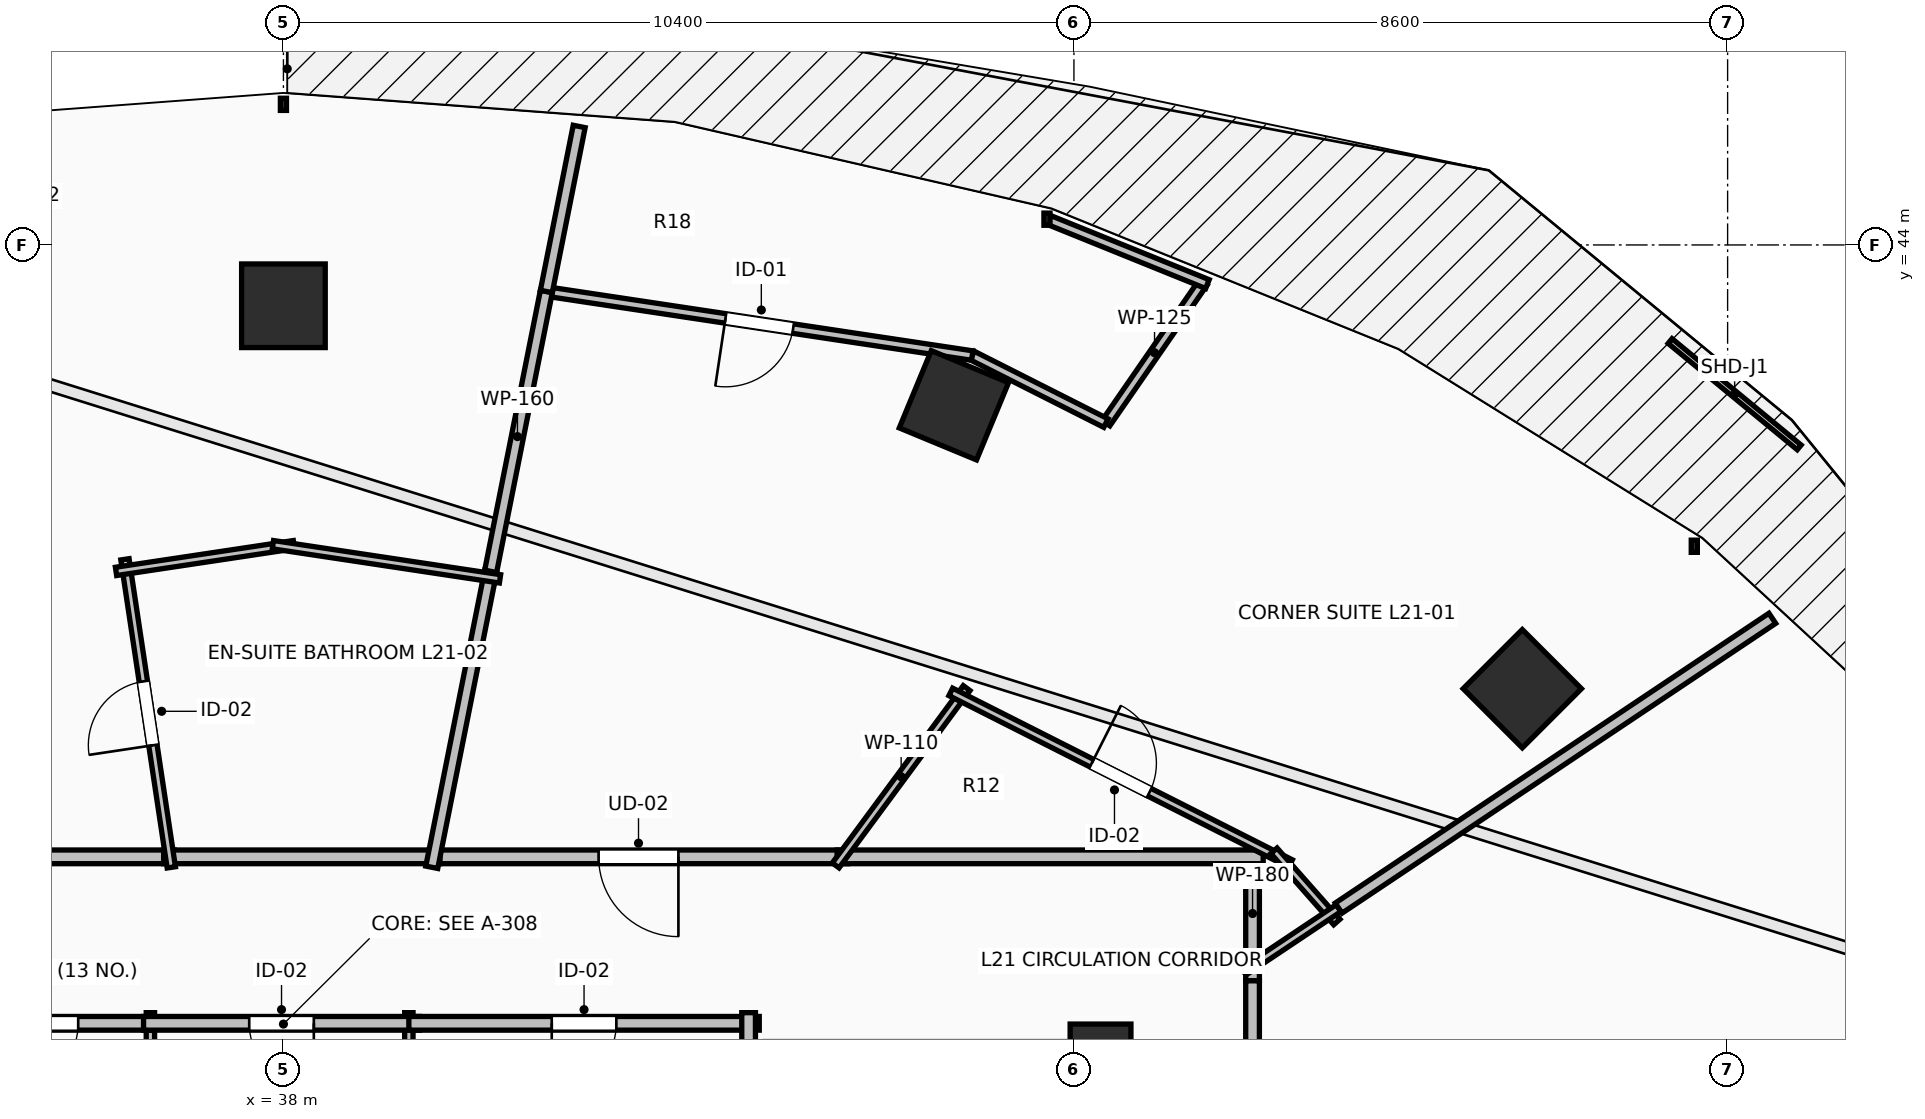
"""IFC4 building model, lengths in metres.
Left out: names, types, materials, properties, quantities, classifications, styles, units other than length and angle.
Written with IfcOpenShell. Run it as: python <this file> out.ifc"""

import sys

from ifc_helpers import new_model, si_unit, direction, frame, frame_2d, origin, origin_2d, place, context, subcontext, project, spatial, rectangle, extrude, element, fill, save


model = new_model("IFC4")
c1 = context("Model", 3, precision=1e-05, world=origin(), true_north=direction((0.0, 1.0)))
c2 = subcontext(c1, "Body", "Model", "MODEL_VIEW")
j1 = project(units=[si_unit("LENGTHUNIT", "METRE"), si_unit("PLANEANGLEUNIT", "RADIAN")], contexts=[c1])
p1 = place(None, origin())
s1 = spatial("IfcSite", under=j1, at=p1, CompositionType="ELEMENT")
p2 = place(p1, origin())
s2 = spatial("IfcBuilding", under=s1, at=p2, CompositionType="ELEMENT")
p3 = place(p2, frame((0.0, 0.0, 82.3)))
s3 = spatial("IfcBuildingStorey", under=s2, at=p3, CompositionType="ELEMENT", Elevation=82.3)
for number, where, z_axis, x_axis in (
    (1, (54.299, 38.162, 0.0), (0.0, 0.0, 1.0), (0.707, 0.707, 0.0)),
    (2, (46.821, 41.891, 0.0), (0.0, 0.0, 1.0), (0.383, 0.924, 0.0)),
    (3, (38.0, 43.2, 0.0), (0.0, 0.0, 1.0), (0.0, 1.0, 0.0)),
):
    element("IfcColumn", number, at=place(p3, frame(where, z_axis=z_axis, x_axis=x_axis)), inside=s3, PredefinedType="COLUMN", context=c2, shape_type="SweptSolid", body=[
        extrude(rectangle(XDim=1.1, YDim=1.1, at=origin_2d()), origin(), (0.0, 0.0, 1.0), 3.5),
    ])
p4 = place(p3, frame((48.75, 33.15, 0.0), z_axis=(0.0, 0.0, 1.0), x_axis=(1.0, 0.0, 0.0)))
e4 = element("IfcColumn", 4, at=p4, inside=s3, PredefinedType="PILASTER", context=c2, shape_type="SweptSolid", body=[
    extrude(rectangle(XDim=0.8, YDim=1.2, at=origin_2d()), origin(), (0.0, 0.0, 1.0), 3.5),
])
p5 = place(p3, frame((36.25, 30.34, 0.0), z_axis=(0.0, 0.0, 1.0), x_axis=(0.0, 1.0, 0.0)))
e5 = element("IfcWall", 5, at=p5, inside=s3, PredefinedType="PARTITIONING", context=c2, shape_type="SweptSolid", body=[
    extrude(rectangle(XDim=3.56, YDim=0.11, at=frame_2d((1.78, 0.0))), origin(), (0.0, 0.0, 1.0), 2.432),
])
p6 = place(p3, frame((36.25, 33.76, 0.0), z_axis=(0.0, 0.0, 1.0), x_axis=(-1.0, 0.0, 0.0)))
e6 = element("IfcWall", 6, at=p6, inside=s3, PredefinedType="PARTITIONING", context=c2, shape_type="SweptSolid", body=[
    extrude(rectangle(XDim=2.75, YDim=0.18, at=frame_2d((1.375, 0.0))), origin(), (0.0, 0.0, 1.0), 3.24),
])
p7 = place(p6, frame((0.95, 0.0, 0.0)))
e7 = element("IfcOpeningElement", 7, at=p7, cuts=e6, PredefinedType="OPENING", context=c2, shape_type="SweptSolid", body=[
    extrude(rectangle(XDim=0.85, YDim=2.1, at=frame_2d((0.425, 1.05))), frame((0.0, 0.105, 0.0), z_axis=(0.0, -1.0, 0.0), x_axis=(1.0, 0.0, 0.0)), (0.0, 0.0, 1.0), 0.21),
])
p8 = place(p3, frame((39.65, 30.34, 0.0), z_axis=(0.0, 0.0, 1.0), x_axis=(0.0, 1.0, 0.0)))
e8 = element("IfcWall", 8, at=p8, inside=s3, PredefinedType="PARTITIONING", context=c2, shape_type="SweptSolid", body=[
    extrude(rectangle(XDim=3.56, YDim=0.11, at=frame_2d((1.78, 0.0))), origin(), (0.0, 0.0, 1.0), 2.432),
])
p9 = place(p3, frame((39.79, 33.76, 0.0), z_axis=(0.0, 0.0, 1.0), x_axis=(-1.0, 0.0, 0.0)))
e9 = element("IfcWall", 9, at=p9, inside=s3, PredefinedType="PARTITIONING", context=c2, shape_type="SweptSolid", body=[
    extrude(rectangle(XDim=3.63, YDim=0.18, at=frame_2d((1.815, 0.0))), origin(), (0.0, 0.0, 1.0), 3.24),
])
p10 = place(p9, frame((1.39, 0.0, 0.0)))
e10 = element("IfcOpeningElement", 10, at=p10, cuts=e9, PredefinedType="OPENING", context=c2, shape_type="SweptSolid", body=[
    extrude(rectangle(XDim=0.85, YDim=2.1, at=frame_2d((0.425, 1.05))), frame((0.0, 0.105, 0.0), z_axis=(0.0, -1.0, 0.0), x_axis=(1.0, 0.0, 0.0)), (0.0, 0.0, 1.0), 0.21),
])
p11 = place(p3, frame((44.26, 33.76, 0.0), z_axis=(0.0, 0.0, 1.0), x_axis=(-1.0, 0.0, 0.0)))
e11 = element("IfcWall", 11, at=p11, inside=s3, PredefinedType="PARTITIONING", context=c2, shape_type="SweptSolid", body=[
    extrude(rectangle(XDim=4.61, YDim=0.18, at=frame_2d((2.305, 0.0))), origin(), (0.0, 0.0, 1.0), 3.24),
])
p12 = place(p11, frame((1.88, 0.0, 0.0)))
e12 = element("IfcOpeningElement", 12, at=p12, cuts=e11, PredefinedType="OPENING", context=c2, shape_type="SweptSolid", body=[
    extrude(rectangle(XDim=0.85, YDim=2.1, at=frame_2d((0.425, 1.05))), frame((0.0, 0.105, 0.0), z_axis=(0.0, -1.0, 0.0), x_axis=(1.0, 0.0, 0.0)), (0.0, 0.0, 1.0), 0.21),
])
p13 = place(p3, frame((44.12, 32.97, 0.0), z_axis=(0.0, 0.0, 1.0), x_axis=(0.0, 1.0, 0.0)))
e13 = element("IfcWall", 13, at=p13, inside=s3, PredefinedType="PARTITIONING", context=c2, shape_type="SweptSolid", body=[
    extrude(rectangle(XDim=0.93, YDim=0.18, at=frame_2d((0.465, 0.0))), origin(), (0.0, 0.0, 1.0), 3.24),
])
p14 = place(p3, frame((45.424, 35.95, 0.0), z_axis=(0.0, 0.0, 1.0), x_axis=(-1.0, 0.0, 0.0)))
e14 = element("IfcWall", 14, at=p14, inside=s3, PredefinedType="PARTITIONING", context=c2, shape_type="SweptSolid", body=[
    extrude(rectangle(XDim=5.505, YDim=0.18, at=frame_2d((2.752, 0.0))), origin(), (0.0, 0.0, 1.0), 2.922),
])
p15 = place(p14, frame((2.228, 0.0, 0.0)))
e15 = element("IfcOpeningElement", 15, at=p15, cuts=e14, PredefinedType="OPENING", context=c2, shape_type="SweptSolid", body=[
    extrude(rectangle(XDim=1.05, YDim=2.2, at=frame_2d((0.525, 1.1))), frame((0.0, 0.105, 0.0), z_axis=(0.0, -1.0, 0.0), x_axis=(1.0, 0.0, 0.0)), (0.0, 0.0, 1.0), 0.21),
])
p16 = place(p3, frame((50.75, 34.319, 0.0), z_axis=(0.0, 0.0, 1.0), x_axis=(0.0, 1.0, 0.0)))
e16 = element("IfcWall", 16, at=p16, inside=s3, PredefinedType="PARTITIONING", context=c2, shape_type="SweptSolid", body=[
    extrude(rectangle(XDim=1.771, YDim=0.18, at=frame_2d((0.885, 0.0))), origin(), (0.0, 0.0, 1.0), 2.432),
])
p17 = place(p3, frame((50.89, 35.95, 0.0), z_axis=(0.0, 0.0, 1.0), x_axis=(-1.0, 0.0, 0.0)))
e17 = element("IfcWall", 17, at=p17, inside=s3, PredefinedType="PARTITIONING", context=c2, shape_type="SweptSolid", body=[
    extrude(rectangle(XDim=5.606, YDim=0.18, at=frame_2d((2.803, 0.0))), origin(), (0.0, 0.0, 1.0), 2.432),
])
p18 = place(p3, frame((36.564, 35.95, 0.0), z_axis=(0.0, 0.0, 1.0), x_axis=(-1.0, 0.0, 0.0)))
e18 = element("IfcWall", 18, at=p18, inside=s3, PredefinedType="PARTITIONING", context=c2, shape_type="SweptSolid", body=[
    extrude(rectangle(XDim=5.284, YDim=0.18, at=frame_2d((2.642, 0.0))), origin(), (0.0, 0.0, 1.0), 3.24),
])
p19 = place(p18, frame((2.117, 0.0, 0.0)))
e19 = element("IfcOpeningElement", 19, at=p19, cuts=e18, PredefinedType="OPENING", context=c2, shape_type="SweptSolid", body=[
    extrude(rectangle(XDim=1.05, YDim=2.2, at=frame_2d((0.525, 1.1))), frame((0.0, 0.105, 0.0), z_axis=(0.0, -1.0, 0.0), x_axis=(1.0, 0.0, 0.0)), (0.0, 0.0, 1.0), 0.21),
])
p20 = place(p3, frame((40.059, 35.95, 0.0), z_axis=(0.0, 0.0, 1.0), x_axis=(-1.0, 0.0, 0.0)))
e20 = element("IfcWall", 20, at=p20, inside=s3, PredefinedType="PARTITIONING", context=c2, shape_type="SweptSolid", body=[
    extrude(rectangle(XDim=3.635, YDim=0.18, at=frame_2d((1.817, 0.0))), origin(), (0.0, 0.0, 1.0), 3.24),
])
p21 = place(p3, frame((50.75, 20.779, 0.0), z_axis=(0.0, 0.0, 1.0), x_axis=(0.0, 1.0, 0.0)))
e21 = element("IfcWall", 21, at=p21, inside=s3, PredefinedType="PARTITIONING", context=c2, shape_type="SweptSolid", body=[
    extrude(rectangle(XDim=13.54, YDim=0.18, at=frame_2d((6.77, 0.0))), origin(), (0.0, 0.0, 1.0), 2.432),
])
p22 = place(p21, frame((6.27, 0.0, 0.0)))
e22 = element("IfcOpeningElement", 22, at=p22, cuts=e21, PredefinedType="OPENING", context=c2, shape_type="SweptSolid", body=[
    extrude(rectangle(XDim=1.0, YDim=2.15, at=frame_2d((0.5, 1.075))), frame((0.0, 0.105, 0.0), z_axis=(0.0, -1.0, 0.0), x_axis=(1.0, 0.0, 0.0)), (0.0, 0.0, 1.0), 0.21),
])
p23 = place(p3, frame((45.266, 35.837, 0.0), z_axis=(0.0, 0.0, 1.0), x_axis=(0.594069015324, 0.804414075605, 0.0)))
e23 = element("IfcWall", 23, at=p23, inside=s3, PredefinedType="PARTITIONING", context=c2, shape_type="SweptSolid", body=[
    extrude(rectangle(XDim=2.899, YDim=0.11, at=frame_2d((1.45, 0.0))), origin(), (0.0, 0.0, 1.0), 2.922),
])
p24 = place(p3, frame((46.78, 38.12, 0.0), z_axis=(0.0, 0.0, 1.0), x_axis=(0.892517538434, -0.451012686726, 0.0)))
e24 = element("IfcWall", 24, at=p24, inside=s3, PredefinedType="PARTITIONING", context=c2, shape_type="SweptSolid", body=[
    extrude(rectangle(XDim=5.007, YDim=0.11, at=frame_2d((2.503, 0.0))), origin(), (0.0, 0.0, 1.0), 2.432),
])
p25 = place(p24, frame((2.079, 0.0, 0.0)))
e25 = element("IfcOpeningElement", 25, at=p25, cuts=e24, PredefinedType="OPENING", context=c2, shape_type="SweptSolid", body=[
    extrude(rectangle(XDim=0.85, YDim=2.1, at=frame_2d((0.425, 1.05))), frame((0.0, 0.07, 0.0), z_axis=(0.0, -1.0, 0.0), x_axis=(1.0, 0.0, 0.0)), (0.0, 0.0, 1.0), 0.14),
])
p26 = place(p3, frame((51.031, 36.03, 0.0), z_axis=(0.0, 0.0, 1.0), x_axis=(0.661996266618, -0.749507133377, 0.0)))
e26 = element("IfcWall", 26, at=p26, inside=s3, PredefinedType="PARTITIONING", context=c2, shape_type="SweptSolid", body=[
    extrude(rectangle(XDim=1.25, YDim=0.11, at=frame_2d((0.625, 0.0))), origin(), (0.0, 0.0, 1.0), 2.432),
])
p27 = place(p3, frame((51.882, 35.276, 0.0), z_axis=(0.0, 0.0, 1.0), x_axis=(-0.831374526136, -0.555712513169, 0.0)))
e27 = element("IfcWall", 27, at=p27, inside=s3, PredefinedType="PARTITIONING", context=c2, shape_type="SweptSolid", body=[
    extrude(rectangle(XDim=1.502, YDim=0.11, at=frame_2d((0.751, 0.0))), origin(), (0.0, 0.0, 1.0), 2.922),
])
p28 = place(p3, frame((50.1, 43.507, 0.0), z_axis=(0.0, 0.0, 1.0), x_axis=(-0.568470595976, -0.822703580587, 0.0)))
e28 = element("IfcWall", 28, at=p28, inside=s3, PredefinedType="PARTITIONING", context=c2, shape_type="SweptSolid", body=[
    extrude(rectangle(XDim=2.25, YDim=0.125, at=frame_2d((1.125, 0.0))), origin(), (0.0, 0.0, 1.0), 3.24),
])
p29 = place(p3, frame((48.821, 41.656, 0.0), z_axis=(0.0, 0.0, 1.0), x_axis=(-0.892511395612, 0.451024842668, 0.0)))
e29 = element("IfcWall", 29, at=p29, inside=s3, PredefinedType="PARTITIONING", context=c2, shape_type="SweptSolid", body=[
    extrude(rectangle(XDim=1.971, YDim=0.125, at=frame_2d((0.985, 0.0))), origin(), (0.0, 0.0, 1.0), 3.24),
])
p30 = place(p3, frame((47.062, 42.545, 0.0), z_axis=(0.0, 0.0, 1.0), x_axis=(-0.988869883596, 0.148782906669, 0.0)))
e30 = element("IfcWall", 30, at=p30, inside=s3, PredefinedType="PARTITIONING", context=c2, shape_type="SweptSolid", body=[
    extrude(rectangle(XDim=5.666, YDim=0.125, at=frame_2d((2.833, 0.0))), origin(), (0.0, 0.0, 1.0), 3.24),
])
p31 = place(p30, frame((2.383, 0.0, 0.0)))
e31 = element("IfcOpeningElement", 31, at=p31, cuts=e30, PredefinedType="OPENING", context=c2, shape_type="SweptSolid", body=[
    extrude(rectangle(XDim=0.9, YDim=2.1, at=frame_2d((0.45, 1.05))), frame((0.0, 0.077, 0.0), z_axis=(0.0, -1.0, 0.0), x_axis=(1.0, 0.0, 0.0)), (0.0, 0.0, 1.0), 0.155),
])
p32 = place(p3, frame((50.156, 43.485, 0.0), z_axis=(0.0, 0.0, 1.0), x_axis=(-0.926988791776, 0.375089029327, 0.0)))
e32 = element("IfcWall", 32, at=p32, inside=s3, PredefinedType="PARTITIONING", context=c2, shape_type="SweptSolid", body=[
    extrude(rectangle(XDim=2.263, YDim=0.125, at=frame_2d((1.132, 0.0))), origin(), (0.0, 0.0, 1.0), 3.24),
])
p33 = place(p3, frame((41.459, 43.388, 0.0), z_axis=(0.0, 0.0, 1.0), x_axis=(-0.195187593062, -0.980765926975, 0.0)))
e33 = element("IfcWall", 33, at=p33, inside=s3, PredefinedType="PARTITIONING", context=c2, shape_type="SweptSolid", body=[
    extrude(rectangle(XDim=3.894, YDim=0.16, at=frame_2d((1.947, 0.0))), origin(), (0.0, 0.0, 1.0), 2.677),
])
p34 = place(p3, frame((40.727, 39.706, 0.0), z_axis=(0.0, 0.0, 1.0), x_axis=(-0.195252736913, -0.980752960091, 0.0)))
e34 = element("IfcWall", 34, at=p34, inside=s3, PredefinedType="PARTITIONING", context=c2, shape_type="SweptSolid", body=[
    extrude(rectangle(XDim=3.97, YDim=0.16, at=frame_2d((1.985, 0.0))), origin(), (0.0, 0.0, 1.0), 2.874),
])
p35 = place(p3, frame((51.883, 35.276, 0.0), z_axis=(0.0, 0.0, 1.0), x_axis=(0.831464132421, 0.555578434154, 0.0)))
e35 = element("IfcWall", 35, at=p35, inside=s3, PredefinedType="PARTITIONING", context=c2, shape_type="SweptSolid", body=[
    extrude(rectangle(XDim=6.862, YDim=0.16, at=frame_2d((3.431, 0.0))), origin(), (0.0, 0.0, 1.0), 2.677),
])
p36 = place(p3, frame((41.891, 45.559, 0.0), z_axis=(0.0, 0.0, 1.0), x_axis=(-0.195204079936, -0.980762645688, 0.0)))
e36 = element("IfcWall", 36, at=p36, inside=s3, PredefinedType="PARTITIONING", context=c2, shape_type="SweptSolid", body=[
    extrude(rectangle(XDim=2.214, YDim=0.16, at=frame_2d((1.107, 0.0))), origin(), (0.0, 0.0, 1.0), 3.24),
])
p37 = place(p3, frame((36.525, 35.812, 0.0), z_axis=(0.0, 0.0, 1.0), x_axis=(-0.148739497936, 0.988876413792, 0.0)))
e37 = element("IfcWall", 37, at=p37, inside=s3, PredefinedType="PARTITIONING", context=c2, shape_type="SweptSolid", body=[
    extrude(rectangle(XDim=4.099, YDim=0.11, at=frame_2d((2.049, 0.0))), origin(), (0.0, 0.0, 1.0), 2.874),
])
p38 = place(p37, frame((1.624, 0.0, 0.0)))
e38 = element("IfcOpeningElement", 38, at=p38, cuts=e37, PredefinedType="OPENING", context=c2, shape_type="SweptSolid", body=[
    extrude(rectangle(XDim=0.85, YDim=2.1, at=frame_2d((0.425, 1.05))), frame((0.0, 0.07, 0.0), z_axis=(0.0, -1.0, 0.0), x_axis=(1.0, 0.0, 0.0)), (0.0, 0.0, 1.0), 0.14),
])
p39 = place(p3, frame((35.798, 39.705, 0.0), z_axis=(0.0, 0.0, 1.0), x_axis=(0.988893947493, 0.148622880511, 0.0)))
e39 = element("IfcWall", 39, at=p39, inside=s3, PredefinedType="PARTITIONING", context=c2, shape_type="SweptSolid", body=[
    extrude(rectangle(XDim=2.367, YDim=0.11, at=frame_2d((1.184, 0.0))), origin(), (0.0, 0.0, 1.0), 2.874),
])
p40 = place(p3, frame((37.862, 40.057, 0.0), z_axis=(0.0, 0.0, 1.0), x_axis=(0.988861549405, -0.148838288446, 0.0)))
e40 = element("IfcWall", 40, at=p40, inside=s3, PredefinedType="PARTITIONING", context=c2, shape_type="SweptSolid", body=[
    extrude(rectangle(XDim=3.021, YDim=0.11, at=frame_2d((1.511, 0.0))), origin(), (0.0, 0.0, 1.0), 3.24),
])
p41 = place(p7, origin())
e41 = element("IfcDoor", 41, at=p41, inside=s3, OperationType="SINGLE_SWING_RIGHT", PredefinedType="DOOR", context=c2, shape_type="SweptSolid", body=[
    extrude(rectangle(XDim=0.85, YDim=2.1, at=frame_2d((0.425, 1.05))), frame((0.0, 0.025, 0.0), z_axis=(0.0, -1.0, 0.0), x_axis=(1.0, 0.0, 0.0)), (0.0, 0.0, 1.0), 0.05),
])
fill(e7, e41)
p42 = place(p10, origin())
e42 = element("IfcDoor", 42, at=p42, inside=s3, OperationType="SINGLE_SWING_LEFT", PredefinedType="DOOR", context=c2, shape_type="SweptSolid", body=[
    extrude(rectangle(XDim=0.85, YDim=2.1, at=frame_2d((0.425, 1.05))), frame((0.0, 0.025, 0.0), z_axis=(0.0, -1.0, 0.0), x_axis=(1.0, 0.0, 0.0)), (0.0, 0.0, 1.0), 0.05),
])
fill(e10, e42)
p43 = place(p12, origin())
e43 = element("IfcDoor", 43, at=p43, inside=s3, OperationType="SINGLE_SWING_RIGHT", PredefinedType="DOOR", context=c2, shape_type="SweptSolid", body=[
    extrude(rectangle(XDim=0.85, YDim=2.1, at=frame_2d((0.425, 1.05))), frame((0.0, 0.025, 0.0), z_axis=(0.0, -1.0, 0.0), x_axis=(1.0, 0.0, 0.0)), (0.0, 0.0, 1.0), 0.05),
])
fill(e12, e43)
p44 = place(p15, origin())
e44 = element("IfcDoor", 44, at=p44, inside=s3, OperationType="SINGLE_SWING_LEFT", PredefinedType="DOOR", context=c2, shape_type="SweptSolid", body=[
    extrude(rectangle(XDim=1.05, YDim=2.2, at=frame_2d((0.525, 1.1))), frame((0.0, 0.025, 0.0), z_axis=(0.0, -1.0, 0.0), x_axis=(1.0, 0.0, 0.0)), (0.0, 0.0, 1.0), 0.05),
])
fill(e15, e44)
p45 = place(p25, origin())
e45 = element("IfcDoor", 45, at=p45, inside=s3, OperationType="SINGLE_SWING_LEFT", PredefinedType="DOOR", context=c2, shape_type="SweptSolid", body=[
    extrude(rectangle(XDim=0.85, YDim=2.1, at=frame_2d((0.425, 1.05))), frame((0.0, 0.025, 0.0), z_axis=(0.0, -1.0, 0.0), x_axis=(1.0, 0.0, 0.0)), (0.0, 0.0, 1.0), 0.05),
])
fill(e25, e45)
p46 = place(p31, origin())
e46 = element("IfcDoor", 46, at=p46, inside=s3, OperationType="SINGLE_SWING_RIGHT", PredefinedType="DOOR", context=c2, shape_type="SweptSolid", body=[
    extrude(rectangle(XDim=0.9, YDim=2.1, at=frame_2d((0.45, 1.05))), frame((0.0, 0.025, 0.0), z_axis=(0.0, -1.0, 0.0), x_axis=(1.0, 0.0, 0.0)), (0.0, 0.0, 1.0), 0.05),
])
fill(e31, e46)
p47 = place(p38, origin())
e47 = element("IfcDoor", 47, at=p47, inside=s3, OperationType="SINGLE_SWING_LEFT", PredefinedType="DOOR", context=c2, shape_type="SweptSolid", body=[
    extrude(rectangle(XDim=0.85, YDim=2.1, at=frame_2d((0.425, 1.05))), frame((0.0, 0.025, 0.0), z_axis=(0.0, -1.0, 0.0), x_axis=(1.0, 0.0, 0.0)), (0.0, 0.0, 1.0), 0.05),
])
fill(e38, e47)
save(model, sys.argv[1])
